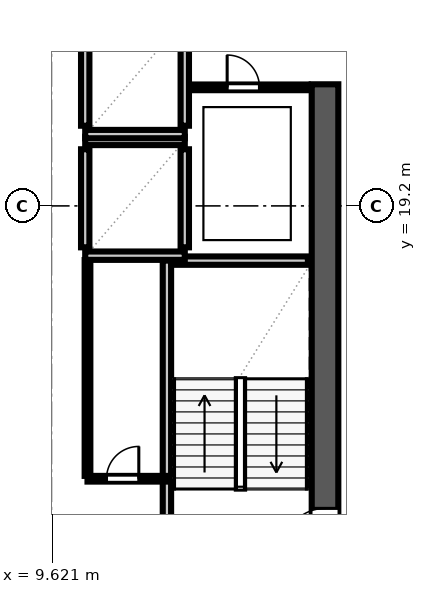
"""IFC4 building model, lengths in metres.
Left out: names, types, materials, properties, quantities, classifications, styles, units other than length and angle.
Written with IfcOpenShell. Run it as: python <this file> out.ifc"""

import sys

from ifc_helpers import new_model, si_unit, direction, frame, frame_2d, origin, place, context, subcontext, project, spatial, rectangle, extrude, element, fill, save


model = new_model("IFC4")
c1 = context("Model", 3, precision=1e-05, world=origin(), true_north=direction((0.0, 1.0)))
c2 = subcontext(c1, "Body", "Model", "MODEL_VIEW")
j1 = project(units=[si_unit("LENGTHUNIT", "METRE"), si_unit("PLANEANGLEUNIT", "RADIAN")], contexts=[c1])
p1 = place(None, origin())
s1 = spatial("IfcSite", under=j1, at=p1, CompositionType="ELEMENT")
p2 = place(p1, origin())
s2 = spatial("IfcBuilding", under=s1, at=p2, CompositionType="ELEMENT")
p3 = place(p2, frame((0.0, 0.0, 112.8)))
s3 = spatial("IfcBuildingStorey", under=s2, at=p3, CompositionType="ELEMENT", Elevation=112.8)
p4 = place(p3, frame((16.8, 9.95, 0.0), z_axis=(0.0, 0.0, 1.0), x_axis=(0.0, 1.0, 0.0)))
e1 = element("IfcWall", 1, at=p4, inside=s3, PredefinedType="SHEAR", context=c2, shape_type="SweptSolid", body=[
    extrude(rectangle(XDim=12.45, YDim=0.7, at=frame_2d((6.225, 0.0))), origin(), (0.0, 0.0, 1.0), 3.54),
])
p5 = place(p4, frame((0.19, 0.0, 0.0)))
e2 = element("IfcOpeningElement", 2, at=p5, cuts=e1, PredefinedType="OPENING", context=c2, shape_type="SweptSolid", body=[
    extrude(rectangle(XDim=1.1, YDim=2.2, at=frame_2d((0.55, 1.1))), frame((0.0, 0.362, 0.0), z_axis=(0.0, -1.0, 0.0), x_axis=(1.0, 0.0, 0.0)), (0.0, 0.0, 1.0), 0.724),
])
p6 = place(p3, frame((12.64, 10.05, 0.0), z_axis=(0.0, 0.0, 1.0), x_axis=(0.0, 1.0, 0.0)))
e3 = element("IfcWall", 3, at=p6, inside=s3, PredefinedType="SOLIDWALL", context=c2, shape_type="SweptSolid", body=[
    extrude(rectangle(XDim=7.71, YDim=0.22, at=frame_2d((3.855, 0.0))), origin(), (0.0, 0.0, 1.0), 3.54),
])
p7 = place(p3, frame((12.75, 17.76, 0.0), z_axis=(0.0, 0.0, 1.0), x_axis=(1.0, 0.0, 0.0)))
e4 = element("IfcWall", 4, at=p7, inside=s3, PredefinedType="SOLIDWALL", context=c2, shape_type="SweptSolid", body=[
    extrude(rectangle(XDim=3.6, YDim=0.22, at=frame_2d((1.8, 0.0))), origin(), (0.0, 0.0, 1.0), 3.54),
])
for number, where, z_axis, x_axis in (
    (5, (10.49, 18.11, 0.0), (0.0, 0.0, 1.0), (0.0, 1.0, 0.0)),
    (6, (13.11, 18.11, 0.0), (0.0, 0.0, 1.0), (0.0, 1.0, 0.0)),
):
    element("IfcWall", number, at=place(p3, frame(where, z_axis=z_axis, x_axis=x_axis)), inside=s3, PredefinedType="SOLIDWALL", context=c2, shape_type="SweptSolid", body=[
        extrude(rectangle(XDim=2.58, YDim=0.22, at=frame_2d((1.29, 0.0))), origin(), (0.0, 0.0, 1.0), 3.54),
    ])
for number, where, z_axis, x_axis in (
    (7, (10.49, 17.89, 0.0), (0.0, 0.0, 1.0), (1.0, 0.0, 0.0)),
    (8, (10.49, 20.91, 0.0), (0.0, 0.0, 1.0), (1.0, 0.0, 0.0)),
):
    element("IfcWall", number, at=place(p3, frame(where, z_axis=z_axis, x_axis=x_axis)), inside=s3, PredefinedType="SOLIDWALL", context=c2, shape_type="SweptSolid", body=[
        extrude(rectangle(XDim=2.62, YDim=0.22, at=frame_2d((1.31, 0.0))), origin(), (0.0, 0.0, 1.0), 3.54),
    ])
for number, where, z_axis, x_axis in (
    (9, (10.49, 21.31, 0.0), (0.0, 0.0, 1.0), (0.0, 1.0, 0.0)),
    (10, (13.11, 21.31, 0.0), (0.0, 0.0, 1.0), (0.0, 1.0, 0.0)),
):
    element("IfcWall", number, at=place(p3, frame(where, z_axis=z_axis, x_axis=x_axis)), inside=s3, PredefinedType="SOLIDWALL", context=c2, shape_type="SweptSolid", body=[
        extrude(rectangle(XDim=2.58, YDim=0.22, at=frame_2d((1.29, 0.0))), origin(), (0.0, 0.0, 1.0), 3.54),
    ])
p8 = place(p3, frame((10.49, 21.09, 0.0), z_axis=(0.0, 0.0, 1.0), x_axis=(1.0, 0.0, 0.0)))
e11 = element("IfcWall", 11, at=p8, inside=s3, PredefinedType="SOLIDWALL", context=c2, shape_type="SweptSolid", body=[
    extrude(rectangle(XDim=2.62, YDim=0.22, at=frame_2d((1.31, 0.0))), origin(), (0.0, 0.0, 1.0), 3.54),
])
p9 = place(p3, frame((10.55, 12.02, 0.0), z_axis=(0.0, 0.0, 1.0), x_axis=(1.0, 0.0, 0.0)))
e12 = element("IfcWall", 12, at=p9, inside=s3, PredefinedType="PARTITIONING", context=c2, shape_type="SweptSolid", body=[
    extrude(rectangle(XDim=2.08, YDim=0.15, at=frame_2d((1.04, 0.0))), origin(), (0.0, 0.0, 1.0), 3.54),
])
p10 = place(p9, frame((0.5, 0.0, 0.0)))
e13 = element("IfcOpeningElement", 13, at=p10, cuts=e12, PredefinedType="OPENING", context=c2, shape_type="SweptSolid", body=[
    extrude(rectangle(XDim=0.85, YDim=2.1, at=frame_2d((0.425, 1.05))), frame((0.0, 0.087, 0.0), z_axis=(0.0, -1.0, 0.0), x_axis=(1.0, 0.0, 0.0)), (0.0, 0.0, 1.0), 0.174),
])
p11 = place(p3, frame((10.55, 12.095, 0.0), z_axis=(0.0, 0.0, 1.0), x_axis=(0.0, 1.0, 0.0)))
e14 = element("IfcWall", 14, at=p11, inside=s3, PredefinedType="PARTITIONING", context=c2, shape_type="SweptSolid", body=[
    extrude(rectangle(XDim=5.68, YDim=0.15, at=frame_2d((2.84, 0.0))), origin(), (0.0, 0.0, 1.0), 3.54),
])
p12 = place(p3, frame((13.225, 22.32, 0.0), z_axis=(0.0, 0.0, 1.0), x_axis=(1.0, 0.0, 0.0)))
e15 = element("IfcWall", 15, at=p12, inside=s3, PredefinedType="PARTITIONING", context=c2, shape_type="SweptSolid", body=[
    extrude(rectangle(XDim=3.12, YDim=0.15, at=frame_2d((1.56, 0.0))), origin(), (0.0, 0.0, 1.0), 3.54),
])
p13 = place(p12, frame((1.0, 0.0, 0.0)))
e16 = element("IfcOpeningElement", 16, at=p13, cuts=e15, PredefinedType="OPENING", context=c2, shape_type="SweptSolid", body=[
    extrude(rectangle(XDim=0.85, YDim=2.1, at=frame_2d((0.425, 1.05))), frame((0.0, 0.087, 0.0), z_axis=(0.0, -1.0, 0.0), x_axis=(1.0, 0.0, 0.0)), (0.0, 0.0, 1.0), 0.174),
])
p14 = place(p5, origin())
e17 = element("IfcDoor", 17, at=p14, inside=s3, OperationType="SINGLE_SWING_LEFT", PredefinedType="DOOR", context=c2, shape_type="SweptSolid", body=[
    extrude(rectangle(XDim=1.1, YDim=2.2, at=frame_2d((0.55, 1.1))), frame((0.0, 0.025, 0.0), z_axis=(0.0, -1.0, 0.0), x_axis=(1.0, 0.0, 0.0)), (0.0, 0.0, 1.0), 0.05),
])
fill(e2, e17)
p15 = place(p10, origin())
e18 = element("IfcDoor", 18, at=p15, inside=s3, OperationType="SINGLE_SWING_RIGHT", PredefinedType="DOOR", context=c2, shape_type="SweptSolid", body=[
    extrude(rectangle(XDim=0.85, YDim=2.1, at=frame_2d((0.425, 1.05))), frame((0.0, 0.025, 0.0), z_axis=(0.0, -1.0, 0.0), x_axis=(1.0, 0.0, 0.0)), (0.0, 0.0, 1.0), 0.05),
])
fill(e13, e18)
p16 = place(p13, origin())
e19 = element("IfcDoor", 19, at=p16, inside=s3, OperationType="SINGLE_SWING_LEFT", PredefinedType="DOOR", context=c2, shape_type="SweptSolid", body=[
    extrude(rectangle(XDim=0.85, YDim=2.1, at=frame_2d((0.425, 1.05))), frame((0.0, 0.025, 0.0), z_axis=(0.0, -1.0, 0.0), x_axis=(1.0, 0.0, 0.0)), (0.0, 0.0, 1.0), 0.05),
])
fill(e16, e19)
save(model, sys.argv[1])
